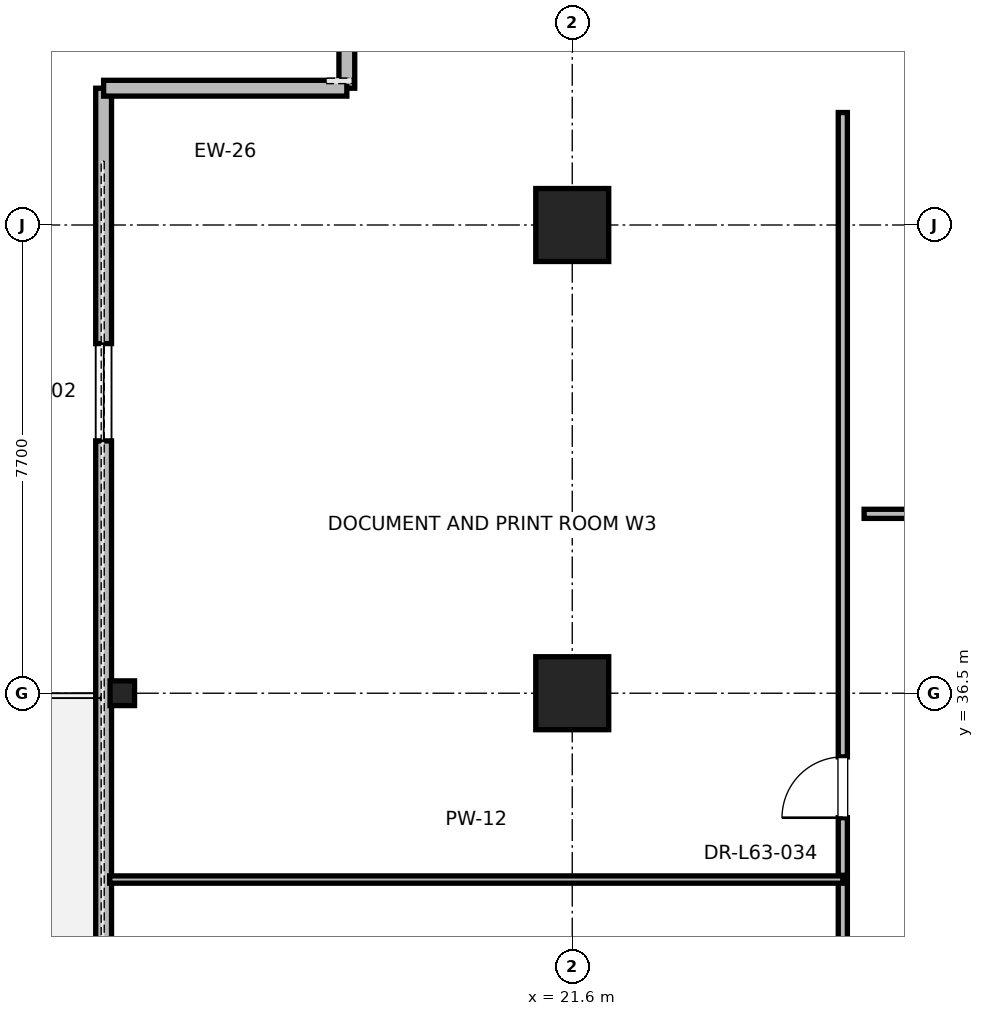
"""IFC4 building model, lengths in metres.
Left out: names, types, materials, properties, quantities, classifications, styles, units other than length and angle.
Written with IfcOpenShell. Run it as: python <this file> out.ifc"""

import sys

from ifc_helpers import new_model, si_unit, direction, frame, frame_2d, origin, origin_2d, place, context, subcontext, project, spatial, rectangle, i_section, extrude, element, fill, save


model = new_model("IFC4")
c1 = context("Model", 3, precision=1e-05, world=origin(), true_north=direction((0.0, 1.0)))
c2 = subcontext(c1, "Body", "Model", "MODEL_VIEW")
j1 = project(units=[si_unit("LENGTHUNIT", "METRE"), si_unit("PLANEANGLEUNIT", "RADIAN")], contexts=[c1])
p1 = place(None, origin())
s1 = spatial("IfcSite", under=j1, at=p1, CompositionType="ELEMENT")
p2 = place(p1, origin())
s2 = spatial("IfcBuilding", under=s1, at=p2, CompositionType="ELEMENT")
p3 = place(p2, frame((0.0, 0.0, 271.2)))
s3 = spatial("IfcBuildingStorey", under=s2, at=p3, CompositionType="ELEMENT", Elevation=271.2)
for number, where, z_axis, x_axis in (
    (1, (21.6, 36.5, 0.0), (0.0, 0.0, 1.0), (1.0, 0.0, 0.0)),
    (2, (21.6, 44.2, 0.0), (0.0, 0.0, 1.0), (1.0, 0.0, 0.0)),
):
    element("IfcColumn", number, at=place(p3, frame(where, z_axis=z_axis, x_axis=x_axis)), inside=s3, PredefinedType="COLUMN", context=c2, shape_type="SweptSolid", body=[
        extrude(rectangle(XDim=1.2, YDim=1.2, at=origin_2d()), origin(), (0.0, 0.0, 1.0), 4.0),
    ])
p4 = place(p3, frame((14.2, 36.5, 0.0), z_axis=(0.0, 0.0, 1.0), x_axis=(1.0, 0.0, 0.0)))
e3 = element("IfcColumn", 3, at=p4, inside=s3, PredefinedType="COLUMN", context=c2, shape_type="SweptSolid", body=[
    extrude(i_section(OverallWidth=0.403, OverallDepth=0.406, WebThickness=0.027, FlangeThickness=0.043, FilletRadius=0.015, at=origin_2d()), origin(), (0.0, 0.0, 1.0), 4.0),
])
p5 = place(p3, frame((13.893, 46.45, 0.0), z_axis=(0.0, 0.0, 1.0), x_axis=(0.0, -1.0, 0.0)))
e4 = element("IfcWall", 4, at=p5, inside=s3, PredefinedType="PARAPET", context=c2, shape_type="SweptSolid", body=[
    extrude(rectangle(XDim=37.899, YDim=0.26, at=frame_2d((18.95, 0.0))), origin(), (0.0, 0.0, 1.0), 3.123),
])
p6 = place(p5, frame((4.2, 0.0, 0.85)))
e5 = element("IfcOpeningElement", 5, at=p6, cuts=e4, PredefinedType="OPENING", context=c2, shape_type="SweptSolid", body=[
    extrude(rectangle(XDim=1.6, YDim=2.1, at=frame_2d((0.8, 1.05))), frame((0.0, 0.13, 0.0), z_axis=(0.0, -1.0, 0.0), x_axis=(1.0, 0.0, 0.0)), (0.0, 0.0, 1.0), 0.26),
])
p7 = place(p5, frame((18.35, 0.0, 0.0)))
e6 = element("IfcOpeningElement", 6, at=p7, cuts=e4, PredefinedType="OPENING", context=c2, shape_type="SweptSolid", body=[
    extrude(rectangle(XDim=1.2, YDim=2.2, at=frame_2d((0.6, 1.1))), frame((0.0, 0.13, 0.0), z_axis=(0.0, -1.0, 0.0), x_axis=(1.0, 0.0, 0.0)), (0.0, 0.0, 1.0), 0.26),
])
p8 = place(p5, frame((32.099, 0.0, 0.85)))
e7 = element("IfcOpeningElement", 7, at=p8, cuts=e4, PredefinedType="OPENING", context=c2, shape_type="SweptSolid", body=[
    extrude(rectangle(XDim=1.6, YDim=2.1, at=frame_2d((0.8, 1.05))), frame((0.0, 0.13, 0.0), z_axis=(0.0, -1.0, 0.0), x_axis=(1.0, 0.0, 0.0)), (0.0, 0.0, 1.0), 0.26),
])
p9 = place(p3, frame((17.893, 49.95, 0.0), z_axis=(0.0, 0.0, 1.0), x_axis=(0.0, -1.0, 0.0)))
e8 = element("IfcWall", 8, at=p9, inside=s3, PredefinedType="PARAPET", context=c2, shape_type="SweptSolid", body=[
    extrude(rectangle(XDim=3.5, YDim=0.26, at=frame_2d((1.75, 0.0))), origin(), (0.0, 0.0, 1.0), 3.785),
])
p10 = place(p9, frame((1.05, 0.0, 0.85)))
e9 = element("IfcOpeningElement", 9, at=p10, cuts=e8, PredefinedType="OPENING", context=c2, shape_type="SweptSolid", body=[
    extrude(rectangle(XDim=1.4, YDim=2.0, at=frame_2d((0.7, 1.0))), frame((0.0, 0.13, 0.0), z_axis=(0.0, -1.0, 0.0), x_axis=(1.0, 0.0, 0.0)), (0.0, 0.0, 1.0), 0.26),
])
p11 = place(p3, frame((17.893, 46.45, 0.0), z_axis=(0.0, 0.0, 1.0), x_axis=(-1.0, 0.0, 0.0)))
e10 = element("IfcWall", 10, at=p11, inside=s3, PredefinedType="PARAPET", context=c2, shape_type="SweptSolid", body=[
    extrude(rectangle(XDim=4.0, YDim=0.26, at=frame_2d((2.0, 0.0))), origin(), (0.0, 0.0, 1.0), 3.785),
])
p12 = place(p3, frame((26.4, 39.45, 0.0), z_axis=(0.0, 0.0, 1.0), x_axis=(1.0, 0.0, 0.0)))
e11 = element("IfcWall", 11, at=p12, inside=s3, PredefinedType="PARTITIONING", context=c2, shape_type="SweptSolid", body=[
    extrude(rectangle(XDim=11.424, YDim=0.15, at=frame_2d((5.712, 0.0))), origin(), (0.0, 0.0, 1.0), 2.85),
])
p13 = place(p12, frame((5.227, 0.0, 0.0)))
e12 = element("IfcOpeningElement", 12, at=p13, cuts=e11, PredefinedType="OPENING", context=c2, shape_type="SweptSolid", body=[
    extrude(rectangle(XDim=1.0, YDim=2.15, at=frame_2d((0.5, 1.075))), frame((0.0, 0.075, 0.0), z_axis=(0.0, -1.0, 0.0), x_axis=(1.0, 0.0, 0.0)), (0.0, 0.0, 1.0), 0.15),
])
p14 = place(p3, frame((26.05, 20.15, 0.0), z_axis=(0.0, 0.0, 1.0), x_axis=(0.0, 1.0, 0.0)))
e13 = element("IfcWall", 13, at=p14, inside=s3, PredefinedType="PARTITIONING", context=c2, shape_type="SweptSolid", body=[
    extrude(rectangle(XDim=13.286, YDim=0.15, at=frame_2d((6.643, 0.0))), origin(), (0.0, 0.0, 1.0), 2.85),
])
p15 = place(p14, frame((6.108, 0.0, 0.0)))
e14 = element("IfcOpeningElement", 14, at=p15, cuts=e13, PredefinedType="OPENING", context=c2, shape_type="SweptSolid", body=[
    extrude(rectangle(XDim=1.0, YDim=2.15, at=frame_2d((0.5, 1.075))), frame((0.0, 0.075, 0.0), z_axis=(0.0, -1.0, 0.0), x_axis=(1.0, 0.0, 0.0)), (0.0, 0.0, 1.0), 0.15),
])
p16 = place(p3, frame((13.993, 33.436, 0.0), z_axis=(0.0, 0.0, 1.0), x_axis=(1.0, 0.0, 0.0)))
e15 = element("IfcWall", 15, at=p16, inside=s3, PredefinedType="PARTITIONING", context=c2, shape_type="SweptSolid", body=[
    extrude(rectangle(XDim=12.057, YDim=0.12, at=frame_2d((6.029, 0.0))), origin(), (0.0, 0.0, 1.0), 2.85),
])
p17 = place(p3, frame((26.05, 33.506, 0.0), z_axis=(0.0, 0.0, 1.0), x_axis=(0.0, 1.0, 0.0)))
e16 = element("IfcWall", 16, at=p17, inside=s3, PredefinedType="PARTITIONING", context=c2, shape_type="SweptSolid", body=[
    extrude(rectangle(XDim=12.544, YDim=0.15, at=frame_2d((6.272, 0.0))), origin(), (0.0, 0.0, 1.0), 2.85),
])
p18 = place(p17, frame((0.947, 0.0, 0.0)))
e17 = element("IfcOpeningElement", 17, at=p18, cuts=e16, PredefinedType="OPENING", context=c2, shape_type="SweptSolid", body=[
    extrude(rectangle(XDim=1.0, YDim=2.15, at=frame_2d((0.5, 1.075))), frame((0.0, 0.075, 0.0), z_axis=(0.0, -1.0, 0.0), x_axis=(1.0, 0.0, 0.0)), (0.0, 0.0, 1.0), 0.15),
])
p19 = place(p6, origin())
e18 = element("IfcWindow", 18, at=p19, inside=s3, PartitioningType="SINGLE_PANEL", PredefinedType="WINDOW", context=c2, shape_type="SweptSolid", body=[
    extrude(rectangle(XDim=1.6, YDim=2.1, at=frame_2d((0.8, 1.05))), frame((0.0, 0.03, 0.0), z_axis=(0.0, -1.0, 0.0), x_axis=(1.0, 0.0, 0.0)), (0.0, 0.0, 1.0), 0.06),
])
fill(e5, e18)
p20 = place(p18, origin())
e19 = element("IfcDoor", 19, at=p20, inside=s3, OperationType="SINGLE_SWING_LEFT", PredefinedType="DOOR", context=c2, shape_type="SweptSolid", body=[
    extrude(rectangle(XDim=1.0, YDim=2.15, at=frame_2d((0.5, 1.075))), frame((0.0, 0.025, 0.0), z_axis=(0.0, -1.0, 0.0), x_axis=(1.0, 0.0, 0.0)), (0.0, 0.0, 1.0), 0.05),
])
fill(e17, e19)
save(model, sys.argv[1])
